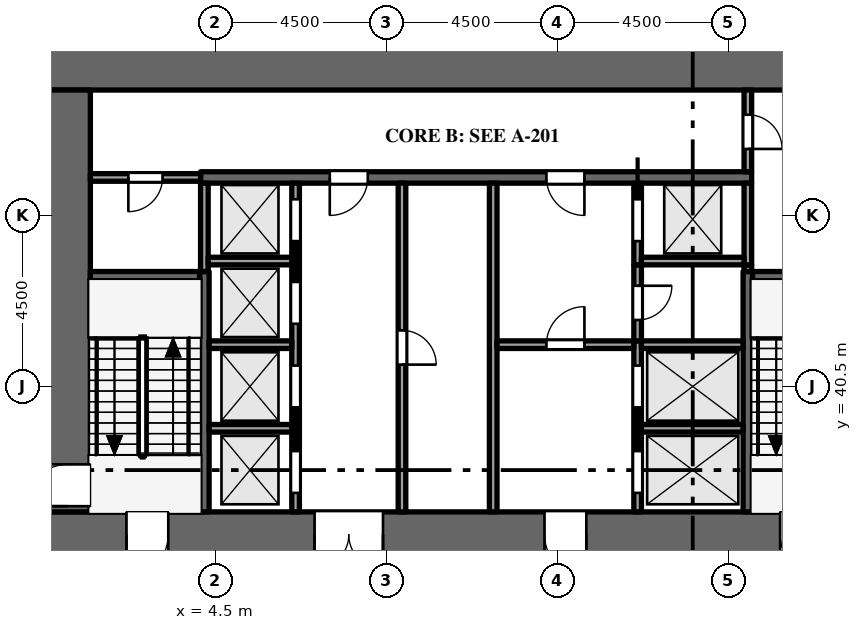
"""IFC4 building model, lengths in metres.
Left out: names, types, materials, properties, quantities, classifications, styles, units other than length and angle.
Written with IfcOpenShell. Run it as: python <this file> out.ifc"""

import sys

from ifc_helpers import new_model, si_unit, direction, frame, frame_2d, origin, place, context, subcontext, project, spatial, rectangle, extrude, element, fill, save


model = new_model("IFC4")
c1 = context("Model", 3, precision=1e-05, world=origin(), true_north=direction((0.0, 1.0)))
c2 = subcontext(c1, "Body", "Model", "MODEL_VIEW")
j1 = project(units=[si_unit("LENGTHUNIT", "METRE"), si_unit("PLANEANGLEUNIT", "RADIAN")], contexts=[c1])
p1 = place(None, origin())
s1 = spatial("IfcSite", under=j1, at=p1, CompositionType="ELEMENT")
p2 = place(p1, origin())
s2 = spatial("IfcBuilding", under=s1, at=p2, CompositionType="ELEMENT")
p3 = place(p2, origin())
s3 = spatial("IfcBuildingStorey", under=s2, at=p3, CompositionType="ELEMENT", Elevation=0.0)
p4 = place(p3, frame((0.0, 36.6, -0.3), z_axis=(0.0, 0.0, 1.0), x_axis=(1.0, 0.0, 0.0)))
e1 = element("IfcWall", 1, at=p4, inside=s3, PredefinedType="SHEAR", context=c2, shape_type="SweptSolid", body=[
    extrude(rectangle(XDim=22.5, YDim=1.2, at=frame_2d((11.25, 0.0))), origin(), (0.0, 0.0, 1.0), 8.15),
])
p5 = place(p4, frame((7.1, 0.0, 0.3)))
e2 = element("IfcOpeningElement", 2, at=p5, cuts=e1, PredefinedType="OPENING", context=c2, shape_type="SweptSolid", body=[
    extrude(rectangle(XDim=1.8, YDim=2.1, at=frame_2d((0.9, 1.05))), frame((0.0, 0.61, 0.0), z_axis=(0.0, -1.0, 0.0), x_axis=(1.0, 0.0, 0.0)), (0.0, 0.0, 1.0), 1.22),
])
p6 = place(p4, frame((13.15, 0.0, 0.3)))
e3 = element("IfcOpeningElement", 3, at=p6, cuts=e1, PredefinedType="OPENING", context=c2, shape_type="SweptSolid", body=[
    extrude(rectangle(XDim=1.1, YDim=2.1, at=frame_2d((0.55, 1.05))), frame((0.0, 0.61, 0.0), z_axis=(0.0, -1.0, 0.0), x_axis=(1.0, 0.0, 0.0)), (0.0, 0.0, 1.0), 1.22),
])
p7 = place(p4, frame((2.15, 0.0, 0.3)))
e4 = element("IfcOpeningElement", 4, at=p7, cuts=e1, PredefinedType="OPENING", context=c2, shape_type="SweptSolid", body=[
    extrude(rectangle(XDim=1.1, YDim=2.1, at=frame_2d((0.55, 1.05))), frame((0.0, 0.61, 0.0), z_axis=(0.0, -1.0, 0.0), x_axis=(1.0, 0.0, 0.0)), (0.0, 0.0, 1.0), 1.22),
])
p8 = place(p4, frame((19.35, 0.0, 0.3)))
e5 = element("IfcOpeningElement", 5, at=p8, cuts=e1, PredefinedType="OPENING", context=c2, shape_type="SweptSolid", body=[
    extrude(rectangle(XDim=1.1, YDim=2.1, at=frame_2d((0.55, 1.05))), frame((0.0, 0.61, 0.0), z_axis=(0.0, -1.0, 0.0), x_axis=(1.0, 0.0, 0.0)), (0.0, 0.0, 1.0), 1.22),
])
p9 = place(p3, frame((0.0, 48.9, -0.3), z_axis=(0.0, 0.0, 1.0), x_axis=(1.0, 0.0, 0.0)))
e6 = element("IfcWall", 6, at=p9, inside=s3, PredefinedType="SHEAR", context=c2, shape_type="SweptSolid", body=[
    extrude(rectangle(XDim=22.5, YDim=1.2, at=frame_2d((11.25, 0.0))), origin(), (0.0, 0.0, 1.0), 8.15),
])
p10 = place(p3, frame((0.6, 37.2, -0.3), z_axis=(0.0, 0.0, 1.0), x_axis=(0.0, 1.0, 0.0)))
e7 = element("IfcWall", 7, at=p10, inside=s3, PredefinedType="SHEAR", context=c2, shape_type="SweptSolid", body=[
    extrude(rectangle(XDim=11.1, YDim=1.2, at=frame_2d((5.55, 0.0))), origin(), (0.0, 0.0, 1.0), 8.15),
])
p11 = place(p10, frame((0.15, 0.0, 0.3)))
e8 = element("IfcOpeningElement", 8, at=p11, cuts=e7, PredefinedType="OPENING", context=c2, shape_type="SweptSolid", body=[
    extrude(rectangle(XDim=1.1, YDim=2.1, at=frame_2d((0.55, 1.05))), frame((0.0, 0.61, 0.0), z_axis=(0.0, -1.0, 0.0), x_axis=(1.0, 0.0, 0.0)), (0.0, 0.0, 1.0), 1.22),
])
p12 = place(p3, frame((4.2, 37.2, 0.0), z_axis=(0.0, 0.0, 1.0), x_axis=(0.0, 1.0, 0.0)))
e9 = element("IfcWall", 9, at=p12, inside=s3, PredefinedType="SHEAR", context=c2, shape_type="SweptSolid", body=[
    extrude(rectangle(XDim=6.325, YDim=0.25, at=frame_2d((3.163, 0.0))), origin(), (0.0, 0.0, 1.0), 7.75),
])
p13 = place(p3, frame((4.2, 43.525, 0.0), z_axis=(0.0, 0.0, 1.0), x_axis=(0.0, 1.0, 0.0)))
e10 = element("IfcWall", 10, at=p13, inside=s3, PredefinedType="SOLIDWALL", context=c2, shape_type="SweptSolid", body=[
    extrude(rectangle(XDim=2.325, YDim=0.2, at=frame_2d((1.163, 0.0))), origin(), (0.0, 0.0, 1.0), 7.75),
])
p14 = place(p3, frame((6.6, 37.2, 0.0), z_axis=(0.0, 0.0, 1.0), x_axis=(0.0, 1.0, 0.0)))
e11 = element("IfcWall", 11, at=p14, inside=s3, PredefinedType="SOLIDWALL", context=c2, shape_type="SweptSolid", body=[
    extrude(rectangle(XDim=8.65, YDim=0.2, at=frame_2d((4.325, 0.0))), origin(), (0.0, 0.0, 1.0), 7.75),
])
p15 = place(p14, frame((0.5, 0.0, 0.012)))
e12 = element("IfcOpeningElement", 12, at=p15, cuts=e11, PredefinedType="OPENING", context=c2, shape_type="SweptSolid", body=[
    extrude(rectangle(XDim=1.1, YDim=2.1, at=frame_2d((0.55, 1.05))), frame((0.0, 0.11, 0.0), z_axis=(0.0, -1.0, 0.0), x_axis=(1.0, 0.0, 0.0)), (0.0, 0.0, 1.0), 0.22),
])
p16 = place(p14, frame((2.75, 0.0, 0.012)))
e13 = element("IfcOpeningElement", 13, at=p16, cuts=e11, PredefinedType="OPENING", context=c2, shape_type="SweptSolid", body=[
    extrude(rectangle(XDim=1.1, YDim=2.1, at=frame_2d((0.55, 1.05))), frame((0.0, 0.11, 0.0), z_axis=(0.0, -1.0, 0.0), x_axis=(1.0, 0.0, 0.0)), (0.0, 0.0, 1.0), 0.22),
])
p17 = place(p14, frame((4.95, 0.0, 0.012)))
e14 = element("IfcOpeningElement", 14, at=p17, cuts=e11, PredefinedType="OPENING", context=c2, shape_type="SweptSolid", body=[
    extrude(rectangle(XDim=1.1, YDim=2.1, at=frame_2d((0.55, 1.05))), frame((0.0, 0.11, 0.0), z_axis=(0.0, -1.0, 0.0), x_axis=(1.0, 0.0, 0.0)), (0.0, 0.0, 1.0), 0.22),
])
p18 = place(p14, frame((7.125, 0.0, 0.012)))
e15 = element("IfcOpeningElement", 15, at=p18, cuts=e11, PredefinedType="OPENING", context=c2, shape_type="SweptSolid", body=[
    extrude(rectangle(XDim=1.1, YDim=2.1, at=frame_2d((0.55, 1.05))), frame((0.0, 0.11, 0.0), z_axis=(0.0, -1.0, 0.0), x_axis=(1.0, 0.0, 0.0)), (0.0, 0.0, 1.0), 0.22),
])
p19 = place(p3, frame((9.4, 37.2, 0.0), z_axis=(0.0, 0.0, 1.0), x_axis=(0.0, 1.0, 0.0)))
e16 = element("IfcWall", 16, at=p19, inside=s3, PredefinedType="PARTITIONING", context=c2, shape_type="SweptSolid", body=[
    extrude(rectangle(XDim=8.65, YDim=0.2, at=frame_2d((4.325, 0.0))), origin(), (0.0, 0.0, 1.0), 7.75),
])
p20 = place(p19, frame((3.875, 0.0, 0.0)))
e17 = element("IfcOpeningElement", 17, at=p20, cuts=e16, PredefinedType="OPENING", context=c2, shape_type="SweptSolid", body=[
    extrude(rectangle(XDim=0.9, YDim=2.1, at=frame_2d((0.45, 1.05))), frame((0.0, 0.11, 0.0), z_axis=(0.0, -1.0, 0.0), x_axis=(1.0, 0.0, 0.0)), (0.0, 0.0, 1.0), 0.22),
])
p21 = place(p3, frame((11.8, 37.2, 0.0), z_axis=(0.0, 0.0, 1.0), x_axis=(0.0, 1.0, 0.0)))
e18 = element("IfcWall", 18, at=p21, inside=s3, PredefinedType="PARTITIONING", context=c2, shape_type="SweptSolid", body=[
    extrude(rectangle(XDim=8.65, YDim=0.2, at=frame_2d((4.325, 0.0))), origin(), (0.0, 0.0, 1.0), 7.75),
])
p22 = place(p3, frame((15.6, 37.2, 0.0), z_axis=(0.0, 0.0, 1.0), x_axis=(0.0, 1.0, 0.0)))
e19 = element("IfcWall", 19, at=p22, inside=s3, PredefinedType="SOLIDWALL", context=c2, shape_type="SweptSolid", body=[
    extrude(rectangle(XDim=4.5, YDim=0.2, at=frame_2d((2.25, 0.0))), origin(), (0.0, 0.0, 1.0), 7.75),
])
p23 = place(p22, frame((0.5, 0.0, 0.012)))
e20 = element("IfcOpeningElement", 20, at=p23, cuts=e19, PredefinedType="OPENING", context=c2, shape_type="SweptSolid", body=[
    extrude(rectangle(XDim=1.1, YDim=2.1, at=frame_2d((0.55, 1.05))), frame((0.0, 0.11, 0.0), z_axis=(0.0, -1.0, 0.0), x_axis=(1.0, 0.0, 0.0)), (0.0, 0.0, 1.0), 0.22),
])
p24 = place(p22, frame((2.75, 0.0, 0.012)))
e21 = element("IfcOpeningElement", 21, at=p24, cuts=e19, PredefinedType="OPENING", context=c2, shape_type="SweptSolid", body=[
    extrude(rectangle(XDim=1.1, YDim=2.1, at=frame_2d((0.55, 1.05))), frame((0.0, 0.11, 0.0), z_axis=(0.0, -1.0, 0.0), x_axis=(1.0, 0.0, 0.0)), (0.0, 0.0, 1.0), 0.22),
])
p25 = place(p3, frame((15.6, 41.7, 0.0), z_axis=(0.0, 0.0, 1.0), x_axis=(0.0, 1.0, 0.0)))
e22 = element("IfcWall", 22, at=p25, inside=s3, PredefinedType="PARTITIONING", context=c2, shape_type="SweptSolid", body=[
    extrude(rectangle(XDim=2.0, YDim=0.2, at=frame_2d((1.0, 0.0))), origin(), (0.0, 0.0, 1.0), 7.75),
])
p26 = place(p25, frame((0.55, 0.0, 0.0)))
e23 = element("IfcOpeningElement", 23, at=p26, cuts=e22, PredefinedType="OPENING", context=c2, shape_type="SweptSolid", body=[
    extrude(rectangle(XDim=0.9, YDim=2.1, at=frame_2d((0.45, 1.05))), frame((0.0, 0.11, 0.0), z_axis=(0.0, -1.0, 0.0), x_axis=(1.0, 0.0, 0.0)), (0.0, 0.0, 1.0), 0.22),
])
p27 = place(p3, frame((15.6, 43.7, 0.0), z_axis=(0.0, 0.0, 1.0), x_axis=(0.0, 1.0, 0.0)))
e24 = element("IfcWall", 24, at=p27, inside=s3, PredefinedType="SOLIDWALL", context=c2, shape_type="SweptSolid", body=[
    extrude(rectangle(XDim=2.15, YDim=0.2, at=frame_2d((1.075, 0.0))), origin(), (0.0, 0.0, 1.0), 7.75),
])
p28 = place(p27, frame((0.625, 0.0, 0.012)))
e25 = element("IfcOpeningElement", 25, at=p28, cuts=e24, PredefinedType="OPENING", context=c2, shape_type="SweptSolid", body=[
    extrude(rectangle(XDim=1.1, YDim=2.1, at=frame_2d((0.55, 1.05))), frame((0.0, 0.11, 0.0), z_axis=(0.0, -1.0, 0.0), x_axis=(1.0, 0.0, 0.0)), (0.0, 0.0, 1.0), 0.22),
])
p29 = place(p3, frame((18.5, 37.2, 0.0), z_axis=(0.0, 0.0, 1.0), x_axis=(0.0, 1.0, 0.0)))
e26 = element("IfcWall", 26, at=p29, inside=s3, PredefinedType="SHEAR", context=c2, shape_type="SweptSolid", body=[
    extrude(rectangle(XDim=6.325, YDim=0.25, at=frame_2d((3.163, 0.0))), origin(), (0.0, 0.0, 1.0), 7.75),
])
p30 = place(p3, frame((18.5, 43.525, 0.0), z_axis=(0.0, 0.0, 1.0), x_axis=(0.0, 1.0, 0.0)))
e27 = element("IfcWall", 27, at=p30, inside=s3, PredefinedType="PARTITIONING", context=c2, shape_type="SweptSolid", body=[
    extrude(rectangle(XDim=0.175, YDim=0.2, at=frame_2d((0.087, 0.0))), origin(), (0.0, 0.0, 1.0), 7.75),
])
p31 = place(p3, frame((18.5, 43.7, 0.0), z_axis=(0.0, 0.0, 1.0), x_axis=(0.0, 1.0, 0.0)))
e28 = element("IfcWall", 28, at=p31, inside=s3, PredefinedType="SOLIDWALL", context=c2, shape_type="SweptSolid", body=[
    extrude(rectangle(XDim=2.15, YDim=0.2, at=frame_2d((1.075, 0.0))), origin(), (0.0, 0.0, 1.0), 7.75),
])
p32 = place(p3, frame((18.5, 46.15, 0.0), z_axis=(0.0, 0.0, 1.0), x_axis=(0.0, 1.0, 0.0)))
e29 = element("IfcWall", 29, at=p32, inside=s3, PredefinedType="PARTITIONING", context=c2, shape_type="SweptSolid", body=[
    extrude(rectangle(XDim=2.15, YDim=0.2, at=frame_2d((1.075, 0.0))), origin(), (0.0, 0.0, 1.0), 7.75),
])
p33 = place(p32, frame((0.6, 0.0, 0.0)))
e30 = element("IfcOpeningElement", 30, at=p33, cuts=e29, PredefinedType="OPENING", context=c2, shape_type="SweptSolid", body=[
    extrude(rectangle(XDim=0.9, YDim=2.1, at=frame_2d((0.45, 1.05))), frame((0.0, 0.11, 0.0), z_axis=(0.0, -1.0, 0.0), x_axis=(1.0, 0.0, 0.0)), (0.0, 0.0, 1.0), 0.22),
])
p34 = place(p3, frame((4.325, 39.4, 0.0), z_axis=(0.0, 0.0, 1.0), x_axis=(1.0, 0.0, 0.0)))
e31 = element("IfcWall", 31, at=p34, inside=s3, PredefinedType="SOLIDWALL", context=c2, shape_type="SweptSolid", body=[
    extrude(rectangle(XDim=2.175, YDim=0.2, at=frame_2d((1.087, 0.0))), origin(), (0.0, 0.0, 1.0), 7.75),
])
p35 = place(p3, frame((15.7, 39.4, 0.0), z_axis=(0.0, 0.0, 1.0), x_axis=(1.0, 0.0, 0.0)))
e32 = element("IfcWall", 32, at=p35, inside=s3, PredefinedType="SOLIDWALL", context=c2, shape_type="SweptSolid", body=[
    extrude(rectangle(XDim=2.675, YDim=0.2, at=frame_2d((1.337, 0.0))), origin(), (0.0, 0.0, 1.0), 7.75),
])
p36 = place(p3, frame((4.325, 41.6, 0.0), z_axis=(0.0, 0.0, 1.0), x_axis=(1.0, 0.0, 0.0)))
e33 = element("IfcWall", 33, at=p36, inside=s3, PredefinedType="SOLIDWALL", context=c2, shape_type="SweptSolid", body=[
    extrude(rectangle(XDim=2.175, YDim=0.2, at=frame_2d((1.087, 0.0))), origin(), (0.0, 0.0, 1.0), 7.75),
])
p37 = place(p3, frame((11.9, 41.6, 0.0), z_axis=(0.0, 0.0, 1.0), x_axis=(1.0, 0.0, 0.0)))
e34 = element("IfcWall", 34, at=p37, inside=s3, PredefinedType="PARTITIONING", context=c2, shape_type="SweptSolid", body=[
    extrude(rectangle(XDim=3.6, YDim=0.2, at=frame_2d((1.8, 0.0))), origin(), (0.0, 0.0, 1.0), 7.75),
])
p38 = place(p37, frame((1.3, 0.0, 0.0)))
e35 = element("IfcOpeningElement", 35, at=p38, cuts=e34, PredefinedType="OPENING", context=c2, shape_type="SweptSolid", body=[
    extrude(rectangle(XDim=1.0, YDim=2.1, at=frame_2d((0.5, 1.05))), frame((0.0, 0.11, 0.0), z_axis=(0.0, -1.0, 0.0), x_axis=(1.0, 0.0, 0.0)), (0.0, 0.0, 1.0), 0.22),
])
p39 = place(p3, frame((15.7, 41.6, 0.0), z_axis=(0.0, 0.0, 1.0), x_axis=(1.0, 0.0, 0.0)))
e36 = element("IfcWall", 36, at=p39, inside=s3, PredefinedType="SOLIDWALL", context=c2, shape_type="SweptSolid", body=[
    extrude(rectangle(XDim=2.675, YDim=0.2, at=frame_2d((1.337, 0.0))), origin(), (0.0, 0.0, 1.0), 7.75),
])
p40 = place(p3, frame((1.2, 43.4, 0.0), z_axis=(0.0, 0.0, 1.0), x_axis=(1.0, 0.0, 0.0)))
e37 = element("IfcWall", 37, at=p40, inside=s3, PredefinedType="SHEAR", context=c2, shape_type="SweptSolid", body=[
    extrude(rectangle(XDim=2.875, YDim=0.25, at=frame_2d((1.438, 0.0))), origin(), (0.0, 0.0, 1.0), 7.75),
])
p41 = place(p3, frame((18.625, 43.4, 0.0), z_axis=(0.0, 0.0, 1.0), x_axis=(1.0, 0.0, 0.0)))
e38 = element("IfcWall", 38, at=p41, inside=s3, PredefinedType="SHEAR", context=c2, shape_type="SweptSolid", body=[
    extrude(rectangle(XDim=2.675, YDim=0.25, at=frame_2d((1.337, 0.0))), origin(), (0.0, 0.0, 1.0), 7.75),
])
p42 = place(p3, frame((4.3, 43.8, 0.0), z_axis=(0.0, 0.0, 1.0), x_axis=(1.0, 0.0, 0.0)))
e39 = element("IfcWall", 39, at=p42, inside=s3, PredefinedType="SOLIDWALL", context=c2, shape_type="SweptSolid", body=[
    extrude(rectangle(XDim=2.2, YDim=0.2, at=frame_2d((1.1, 0.0))), origin(), (0.0, 0.0, 1.0), 7.75),
])
p43 = place(p3, frame((15.7, 43.8, 0.0), z_axis=(0.0, 0.0, 1.0), x_axis=(1.0, 0.0, 0.0)))
e40 = element("IfcWall", 40, at=p43, inside=s3, PredefinedType="SOLIDWALL", context=c2, shape_type="SweptSolid", body=[
    extrude(rectangle(XDim=2.7, YDim=0.2, at=frame_2d((1.35, 0.0))), origin(), (0.0, 0.0, 1.0), 7.75),
])
p44 = place(p3, frame((1.2, 46.0, 0.0), z_axis=(0.0, 0.0, 1.0), x_axis=(1.0, 0.0, 0.0)))
e41 = element("IfcWall", 41, at=p44, inside=s3, PredefinedType="PARTITIONING", context=c2, shape_type="SweptSolid", body=[
    extrude(rectangle(XDim=2.9, YDim=0.2, at=frame_2d((1.45, 0.0))), origin(), (0.0, 0.0, 1.0), 7.75),
])
p45 = place(p44, frame((1.0, 0.0, 0.0)))
e42 = element("IfcOpeningElement", 42, at=p45, cuts=e41, PredefinedType="OPENING", context=c2, shape_type="SweptSolid", body=[
    extrude(rectangle(XDim=0.9, YDim=2.1, at=frame_2d((0.45, 1.05))), frame((0.0, 0.11, 0.0), z_axis=(0.0, -1.0, 0.0), x_axis=(1.0, 0.0, 0.0)), (0.0, 0.0, 1.0), 0.22),
])
p46 = place(p3, frame((4.1, 46.0, 0.0), z_axis=(0.0, 0.0, 1.0), x_axis=(1.0, 0.0, 0.0)))
e43 = element("IfcWall", 43, at=p46, inside=s3, PredefinedType="SHEAR", context=c2, shape_type="SweptSolid", body=[
    extrude(rectangle(XDim=14.5, YDim=0.3, at=frame_2d((7.25, 0.0))), origin(), (0.0, 0.0, 1.0), 7.75),
])
p47 = place(p46, frame((3.4, 0.0, 0.0)))
e44 = element("IfcOpeningElement", 44, at=p47, cuts=e43, PredefinedType="OPENING", context=c2, shape_type="SweptSolid", body=[
    extrude(rectangle(XDim=1.0, YDim=2.1, at=frame_2d((0.5, 1.05))), frame((0.0, 0.16, 0.0), z_axis=(0.0, -1.0, 0.0), x_axis=(1.0, 0.0, 0.0)), (0.0, 0.0, 1.0), 0.32),
])
p48 = place(p46, frame((9.1, 0.0, 0.0)))
e45 = element("IfcOpeningElement", 45, at=p48, cuts=e43, PredefinedType="OPENING", context=c2, shape_type="SweptSolid", body=[
    extrude(rectangle(XDim=1.0, YDim=2.1, at=frame_2d((0.5, 1.05))), frame((0.0, 0.16, 0.0), z_axis=(0.0, -1.0, 0.0), x_axis=(1.0, 0.0, 0.0)), (0.0, 0.0, 1.0), 0.32),
])
p49 = place(p15, origin())
e46 = element("IfcDoor", 46, at=p49, inside=s3, OperationType="SLIDING_TO_RIGHT", PredefinedType="DOOR", context=c2, shape_type="SweptSolid", body=[
    extrude(rectangle(XDim=1.1, YDim=2.1, at=frame_2d((0.55, 1.05))), frame((0.0, 0.025, 0.0), z_axis=(0.0, -1.0, 0.0), x_axis=(1.0, 0.0, 0.0)), (0.0, 0.0, 1.0), 0.05),
])
fill(e12, e46)
p50 = place(p16, origin())
e47 = element("IfcDoor", 47, at=p50, inside=s3, OperationType="SLIDING_TO_LEFT", PredefinedType="DOOR", context=c2, shape_type="SweptSolid", body=[
    extrude(rectangle(XDim=1.1, YDim=2.1, at=frame_2d((0.55, 1.05))), frame((0.0, 0.025, 0.0), z_axis=(0.0, -1.0, 0.0), x_axis=(1.0, 0.0, 0.0)), (0.0, 0.0, 1.0), 0.05),
])
fill(e13, e47)
p51 = place(p17, origin())
e48 = element("IfcDoor", 48, at=p51, inside=s3, OperationType="SLIDING_TO_RIGHT", PredefinedType="DOOR", context=c2, shape_type="SweptSolid", body=[
    extrude(rectangle(XDim=1.1, YDim=2.1, at=frame_2d((0.55, 1.05))), frame((0.0, 0.025, 0.0), z_axis=(0.0, -1.0, 0.0), x_axis=(1.0, 0.0, 0.0)), (0.0, 0.0, 1.0), 0.05),
])
fill(e14, e48)
p52 = place(p18, origin())
e49 = element("IfcDoor", 49, at=p52, inside=s3, OperationType="SLIDING_TO_LEFT", PredefinedType="DOOR", context=c2, shape_type="SweptSolid", body=[
    extrude(rectangle(XDim=1.1, YDim=2.1, at=frame_2d((0.55, 1.05))), frame((0.0, 0.025, 0.0), z_axis=(0.0, -1.0, 0.0), x_axis=(1.0, 0.0, 0.0)), (0.0, 0.0, 1.0), 0.05),
])
fill(e15, e49)
p53 = place(p23, origin())
e50 = element("IfcDoor", 50, at=p53, inside=s3, OperationType="SLIDING_TO_RIGHT", PredefinedType="DOOR", context=c2, shape_type="SweptSolid", body=[
    extrude(rectangle(XDim=1.1, YDim=2.1, at=frame_2d((0.55, 1.05))), frame((0.0, 0.025, 0.0), z_axis=(0.0, -1.0, 0.0), x_axis=(1.0, 0.0, 0.0)), (0.0, 0.0, 1.0), 0.05),
])
fill(e20, e50)
p54 = place(p24, origin())
e51 = element("IfcDoor", 51, at=p54, inside=s3, OperationType="SLIDING_TO_LEFT", PredefinedType="DOOR", context=c2, shape_type="SweptSolid", body=[
    extrude(rectangle(XDim=1.1, YDim=2.1, at=frame_2d((0.55, 1.05))), frame((0.0, 0.025, 0.0), z_axis=(0.0, -1.0, 0.0), x_axis=(1.0, 0.0, 0.0)), (0.0, 0.0, 1.0), 0.05),
])
fill(e21, e51)
p55 = place(p28, origin())
e52 = element("IfcDoor", 52, at=p55, inside=s3, OperationType="SLIDING_TO_RIGHT", PredefinedType="DOOR", context=c2, shape_type="SweptSolid", body=[
    extrude(rectangle(XDim=1.1, YDim=2.1, at=frame_2d((0.55, 1.05))), frame((0.0, 0.025, 0.0), z_axis=(0.0, -1.0, 0.0), x_axis=(1.0, 0.0, 0.0)), (0.0, 0.0, 1.0), 0.05),
])
fill(e25, e52)
p56 = place(p5, origin())
e53 = element("IfcDoor", 53, at=p56, inside=s3, OperationType="DOUBLE_DOOR_SINGLE_SWING", PredefinedType="DOOR", context=c2, shape_type="SweptSolid", body=[
    extrude(rectangle(XDim=1.8, YDim=2.1, at=frame_2d((0.9, 1.05))), frame((0.0, 0.025, 0.0), z_axis=(0.0, -1.0, 0.0), x_axis=(1.0, 0.0, 0.0)), (0.0, 0.0, 1.0), 0.05),
])
fill(e2, e53)
p57 = place(p47, origin())
e54 = element("IfcDoor", 54, at=p57, inside=s3, OperationType="SINGLE_SWING_LEFT", PredefinedType="DOOR", context=c2, shape_type="SweptSolid", body=[
    extrude(rectangle(XDim=1.0, YDim=2.1, at=frame_2d((0.5, 1.05))), frame((0.0, 0.025, 0.0), z_axis=(0.0, -1.0, 0.0), x_axis=(1.0, 0.0, 0.0)), (0.0, 0.0, 1.0), 0.05),
])
fill(e44, e54)
p58 = place(p6, origin())
e55 = element("IfcDoor", 55, at=p58, inside=s3, OperationType="SINGLE_SWING_RIGHT", PredefinedType="DOOR", context=c2, shape_type="SweptSolid", body=[
    extrude(rectangle(XDim=1.1, YDim=2.1, at=frame_2d((0.55, 1.05))), frame((0.0, 0.025, 0.0), z_axis=(0.0, -1.0, 0.0), x_axis=(1.0, 0.0, 0.0)), (0.0, 0.0, 1.0), 0.05),
])
fill(e3, e55)
p59 = place(p38, origin())
e56 = element("IfcDoor", 56, at=p59, inside=s3, OperationType="SINGLE_SWING_RIGHT", PredefinedType="DOOR", context=c2, shape_type="SweptSolid", body=[
    extrude(rectangle(XDim=1.0, YDim=2.1, at=frame_2d((0.5, 1.05))), frame((0.0, 0.025, 0.0), z_axis=(0.0, -1.0, 0.0), x_axis=(1.0, 0.0, 0.0)), (0.0, 0.0, 1.0), 0.05),
])
fill(e35, e56)
p60 = place(p48, origin())
e57 = element("IfcDoor", 57, at=p60, inside=s3, OperationType="SINGLE_SWING_RIGHT", PredefinedType="DOOR", context=c2, shape_type="SweptSolid", body=[
    extrude(rectangle(XDim=1.0, YDim=2.1, at=frame_2d((0.5, 1.05))), frame((0.0, 0.025, 0.0), z_axis=(0.0, -1.0, 0.0), x_axis=(1.0, 0.0, 0.0)), (0.0, 0.0, 1.0), 0.05),
])
fill(e45, e57)
p61 = place(p7, origin())
e58 = element("IfcDoor", 58, at=p61, inside=s3, OperationType="SINGLE_SWING_LEFT", PredefinedType="DOOR", context=c2, shape_type="SweptSolid", body=[
    extrude(rectangle(XDim=1.1, YDim=2.1, at=frame_2d((0.55, 1.05))), frame((0.0, 0.025, 0.0), z_axis=(0.0, -1.0, 0.0), x_axis=(1.0, 0.0, 0.0)), (0.0, 0.0, 1.0), 0.05),
])
fill(e4, e58)
p62 = place(p11, origin())
e59 = element("IfcDoor", 59, at=p62, inside=s3, OperationType="SINGLE_SWING_LEFT", PredefinedType="DOOR", context=c2, shape_type="SweptSolid", body=[
    extrude(rectangle(XDim=1.1, YDim=2.1, at=frame_2d((0.55, 1.05))), frame((0.0, 0.025, 0.0), z_axis=(0.0, -1.0, 0.0), x_axis=(1.0, 0.0, 0.0)), (0.0, 0.0, 1.0), 0.05),
])
fill(e8, e59)
p63 = place(p8, origin())
e60 = element("IfcDoor", 60, at=p63, inside=s3, OperationType="SINGLE_SWING_RIGHT", PredefinedType="DOOR", context=c2, shape_type="SweptSolid", body=[
    extrude(rectangle(XDim=1.1, YDim=2.1, at=frame_2d((0.55, 1.05))), frame((0.0, 0.025, 0.0), z_axis=(0.0, -1.0, 0.0), x_axis=(1.0, 0.0, 0.0)), (0.0, 0.0, 1.0), 0.05),
])
fill(e5, e60)
p64 = place(p45, origin())
e61 = element("IfcDoor", 61, at=p64, inside=s3, OperationType="SINGLE_SWING_LEFT", PredefinedType="DOOR", context=c2, shape_type="SweptSolid", body=[
    extrude(rectangle(XDim=0.9, YDim=2.1, at=frame_2d((0.45, 1.05))), frame((0.0, 0.025, 0.0), z_axis=(0.0, -1.0, 0.0), x_axis=(1.0, 0.0, 0.0)), (0.0, 0.0, 1.0), 0.05),
])
fill(e42, e61)
p65 = place(p33, origin())
e62 = element("IfcDoor", 62, at=p65, inside=s3, OperationType="SINGLE_SWING_LEFT", PredefinedType="DOOR", context=c2, shape_type="SweptSolid", body=[
    extrude(rectangle(XDim=0.9, YDim=2.1, at=frame_2d((0.45, 1.05))), frame((0.0, 0.025, 0.0), z_axis=(0.0, -1.0, 0.0), x_axis=(1.0, 0.0, 0.0)), (0.0, 0.0, 1.0), 0.05),
])
fill(e30, e62)
p66 = place(p20, origin())
e63 = element("IfcDoor", 63, at=p66, inside=s3, OperationType="SINGLE_SWING_LEFT", PredefinedType="DOOR", context=c2, shape_type="SweptSolid", body=[
    extrude(rectangle(XDim=0.9, YDim=2.1, at=frame_2d((0.45, 1.05))), frame((0.0, 0.025, 0.0), z_axis=(0.0, -1.0, 0.0), x_axis=(1.0, 0.0, 0.0)), (0.0, 0.0, 1.0), 0.05),
])
fill(e17, e63)
p67 = place(p26, origin())
e64 = element("IfcDoor", 64, at=p67, inside=s3, OperationType="SINGLE_SWING_RIGHT", PredefinedType="DOOR", context=c2, shape_type="SweptSolid", body=[
    extrude(rectangle(XDim=0.9, YDim=2.1, at=frame_2d((0.45, 1.05))), frame((0.0, 0.025, 0.0), z_axis=(0.0, -1.0, 0.0), x_axis=(1.0, 0.0, 0.0)), (0.0, 0.0, 1.0), 0.05),
])
fill(e23, e64)
save(model, sys.argv[1])
